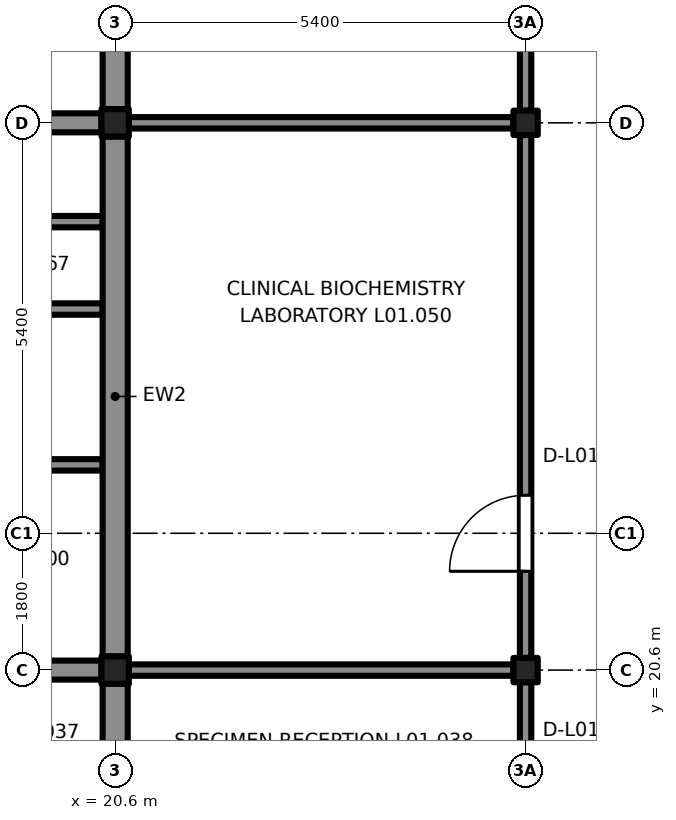
"""IFC4 building model, lengths in metres.
Left out: names, types, materials, properties, quantities, classifications, styles, units other than length and angle.
Written with IfcOpenShell. Run it as: python <this file> out.ifc"""

import sys

from ifc_helpers import new_model, si_unit, direction, frame, frame_2d, origin, origin_2d, place, context, subcontext, project, spatial, rectangle, extrude, element, fill, save


model = new_model("IFC4")
c1 = context("Model", 3, precision=1e-05, world=origin(), true_north=direction((0.0, 1.0)))
c2 = subcontext(c1, "Body", "Model", "MODEL_VIEW")
j1 = project(units=[si_unit("LENGTHUNIT", "METRE"), si_unit("PLANEANGLEUNIT", "RADIAN")], contexts=[c1])
p1 = place(None, origin())
s1 = spatial("IfcSite", under=j1, at=p1, CompositionType="ELEMENT")
p2 = place(p1, origin())
s2 = spatial("IfcBuilding", under=s1, at=p2, CompositionType="ELEMENT")
p3 = place(p2, frame((0.0, 0.0, 6.3)))
s3 = spatial("IfcBuildingStorey", under=s2, at=p3, CompositionType="ELEMENT", Elevation=6.3)
for number, where, z_axis, x_axis in (
    (1, (20.6, 20.6, 0.0), (0.0, 0.0, 1.0), (1.0, 0.0, 0.0)),
    (2, (20.6, 27.8, 0.0), (0.0, 0.0, 1.0), (1.0, 0.0, 0.0)),
):
    element("IfcColumn", number, at=place(p3, frame(where, z_axis=z_axis, x_axis=x_axis)), inside=s3, PredefinedType="COLUMN", context=c2, shape_type="SweptSolid", body=[
        extrude(rectangle(XDim=0.36, YDim=0.36, at=origin_2d()), origin(), (0.0, 0.0, 1.0), 3.9),
    ])
for number, where, z_axis, x_axis in (
    (3, (26.0, 20.6, 0.0), (0.0, 0.0, 1.0), (1.0, 0.0, 0.0)),
    (4, (26.0, 27.8, 0.0), (0.0, 0.0, 1.0), (1.0, 0.0, 0.0)),
):
    element("IfcColumn", number, at=place(p3, frame(where, z_axis=z_axis, x_axis=x_axis)), inside=s3, PredefinedType="COLUMN", context=c2, shape_type="SweptSolid", body=[
        extrude(rectangle(XDim=0.32, YDim=0.32, at=origin_2d()), origin(), (0.0, 0.0, 1.0), 3.9),
    ])
for number, where, z_axis, x_axis in (
    (5, (15.38, 20.6, 0.0), (0.0, 0.0, 1.0), (1.0, 0.0, 0.0)),
    (6, (15.38, 27.8, 0.0), (0.0, 0.0, 1.0), (1.0, 0.0, 0.0)),
):
    element("IfcWall", number, at=place(p3, frame(where, z_axis=z_axis, x_axis=x_axis)), inside=s3, PredefinedType="SHEAR", context=c2, shape_type="SweptSolid", body=[
        extrude(rectangle(XDim=5.04, YDim=0.25, at=frame_2d((2.52, 0.0))), origin(), (0.0, 0.0, 1.0), 3.65),
    ])
for number, where, z_axis, x_axis in (
    (7, (15.325, 23.3, 0.0), (0.0, 0.0, 1.0), (1.0, 0.0, 0.0)),
    (8, (15.325, 25.35, 0.0), (0.0, 0.0, 1.0), (1.0, 0.0, 0.0)),
    (9, (15.325, 26.5, 0.0), (0.0, 0.0, 1.0), (1.0, 0.0, 0.0)),
):
    element("IfcWall", number, at=place(p3, frame(where, z_axis=z_axis, x_axis=x_axis)), inside=s3, PredefinedType="PARTITIONING", context=c2, shape_type="SweptSolid", body=[
        extrude(rectangle(XDim=5.11, YDim=0.15, at=frame_2d((2.555, 0.0))), origin(), (0.0, 0.0, 1.0), 3.65),
    ])
p4 = place(p3, frame((20.6, 20.42, 0.0), z_axis=(0.0, 0.0, 1.0), x_axis=(0.0, -1.0, 0.0)))
e10 = element("IfcWall", 10, at=p4, inside=s3, PredefinedType="SOLIDWALL", context=c2, shape_type="SweptSolid", body=[
    extrude(rectangle(XDim=6.84, YDim=0.33, at=frame_2d((3.42, 0.0))), origin(), (0.0, 0.0, 1.0), 3.22),
])
for number, where, z_axis, x_axis in (
    (11, (20.6, 27.62, 0.0), (0.0, 0.0, 1.0), (0.0, -1.0, 0.0)),
    (12, (20.6, 34.82, 0.0), (0.0, 0.0, 1.0), (0.0, -1.0, 0.0)),
):
    element("IfcWall", number, at=place(p3, frame(where, z_axis=z_axis, x_axis=x_axis)), inside=s3, PredefinedType="SOLIDWALL", context=c2, shape_type="SweptSolid", body=[
        extrude(rectangle(XDim=6.84, YDim=0.33, at=frame_2d((3.42, 0.0))), origin(), (0.0, 0.0, 1.0), 3.22),
    ])
p5 = place(p3, frame((26.0, 17.0, 0.0), z_axis=(0.0, 0.0, 1.0), x_axis=(0.0, 1.0, 0.0)))
e13 = element("IfcWall", 13, at=p5, inside=s3, PredefinedType="PARTITIONING", context=c2, shape_type="SweptSolid", body=[
    extrude(rectangle(XDim=3.44, YDim=0.15, at=frame_2d((1.72, 0.0))), origin(), (0.0, 0.0, 1.0), 3.22),
])
p6 = place(p5, frame((1.3, 0.0, 0.0)))
e14 = element("IfcOpeningElement", 14, at=p6, cuts=e13, PredefinedType="OPENING", context=c2, shape_type="SweptSolid", body=[
    extrude(rectangle(XDim=1.0, YDim=2.1, at=frame_2d((0.5, 1.05))), frame((0.0, 0.085, 0.0), z_axis=(0.0, -1.0, 0.0), x_axis=(1.0, 0.0, 0.0)), (0.0, 0.0, 1.0), 0.17),
])
p7 = place(p3, frame((26.0, 20.76, 0.0), z_axis=(0.0, 0.0, 1.0), x_axis=(0.0, 1.0, 0.0)))
e15 = element("IfcWall", 15, at=p7, inside=s3, PredefinedType="PARTITIONING", context=c2, shape_type="SweptSolid", body=[
    extrude(rectangle(XDim=6.88, YDim=0.15, at=frame_2d((3.44, 0.0))), origin(), (0.0, 0.0, 1.0), 3.22),
])
p8 = place(p7, frame((1.14, 0.0, 0.0)))
e16 = element("IfcOpeningElement", 16, at=p8, cuts=e15, PredefinedType="OPENING", context=c2, shape_type="SweptSolid", body=[
    extrude(rectangle(XDim=1.0, YDim=2.1, at=frame_2d((0.5, 1.05))), frame((0.0, 0.085, 0.0), z_axis=(0.0, -1.0, 0.0), x_axis=(1.0, 0.0, 0.0)), (0.0, 0.0, 1.0), 0.17),
])
p9 = place(p3, frame((20.78, 20.6, 0.0), z_axis=(0.0, 0.0, 1.0), x_axis=(1.0, 0.0, 0.0)))
e17 = element("IfcWall", 17, at=p9, inside=s3, PredefinedType="PARTITIONING", context=c2, shape_type="SweptSolid", body=[
    extrude(rectangle(XDim=5.06, YDim=0.15, at=frame_2d((2.53, 0.0))), origin(), (0.0, 0.0, 1.0), 3.38),
])
p10 = place(p3, frame((26.0, 27.96, 0.0), z_axis=(0.0, 0.0, 1.0), x_axis=(0.0, 1.0, 0.0)))
e18 = element("IfcWall", 18, at=p10, inside=s3, PredefinedType="PARTITIONING", context=c2, shape_type="SweptSolid", body=[
    extrude(rectangle(XDim=3.44, YDim=0.15, at=frame_2d((1.72, 0.0))), origin(), (0.0, 0.0, 1.0), 3.22),
])
p11 = place(p10, frame((1.14, 0.0, 0.0)))
e19 = element("IfcOpeningElement", 19, at=p11, cuts=e18, PredefinedType="OPENING", context=c2, shape_type="SweptSolid", body=[
    extrude(rectangle(XDim=1.0, YDim=2.1, at=frame_2d((0.5, 1.05))), frame((0.0, 0.085, 0.0), z_axis=(0.0, -1.0, 0.0), x_axis=(1.0, 0.0, 0.0)), (0.0, 0.0, 1.0), 0.17),
])
p12 = place(p3, frame((20.78, 27.8, 0.0), z_axis=(0.0, 0.0, 1.0), x_axis=(1.0, 0.0, 0.0)))
e20 = element("IfcWall", 20, at=p12, inside=s3, PredefinedType="PARTITIONING", context=c2, shape_type="SweptSolid", body=[
    extrude(rectangle(XDim=5.06, YDim=0.15, at=frame_2d((2.53, 0.0))), origin(), (0.0, 0.0, 1.0), 3.38),
])
p13 = place(p8, origin())
e21 = element("IfcDoor", 21, at=p13, inside=s3, OperationType="SINGLE_SWING_LEFT", PredefinedType="DOOR", context=c2, shape_type="SweptSolid", body=[
    extrude(rectangle(XDim=1.0, YDim=2.1, at=frame_2d((0.5, 1.05))), frame((0.0, 0.025, 0.0), z_axis=(0.0, -1.0, 0.0), x_axis=(1.0, 0.0, 0.0)), (0.0, 0.0, 1.0), 0.05),
])
fill(e16, e21)
save(model, sys.argv[1])
